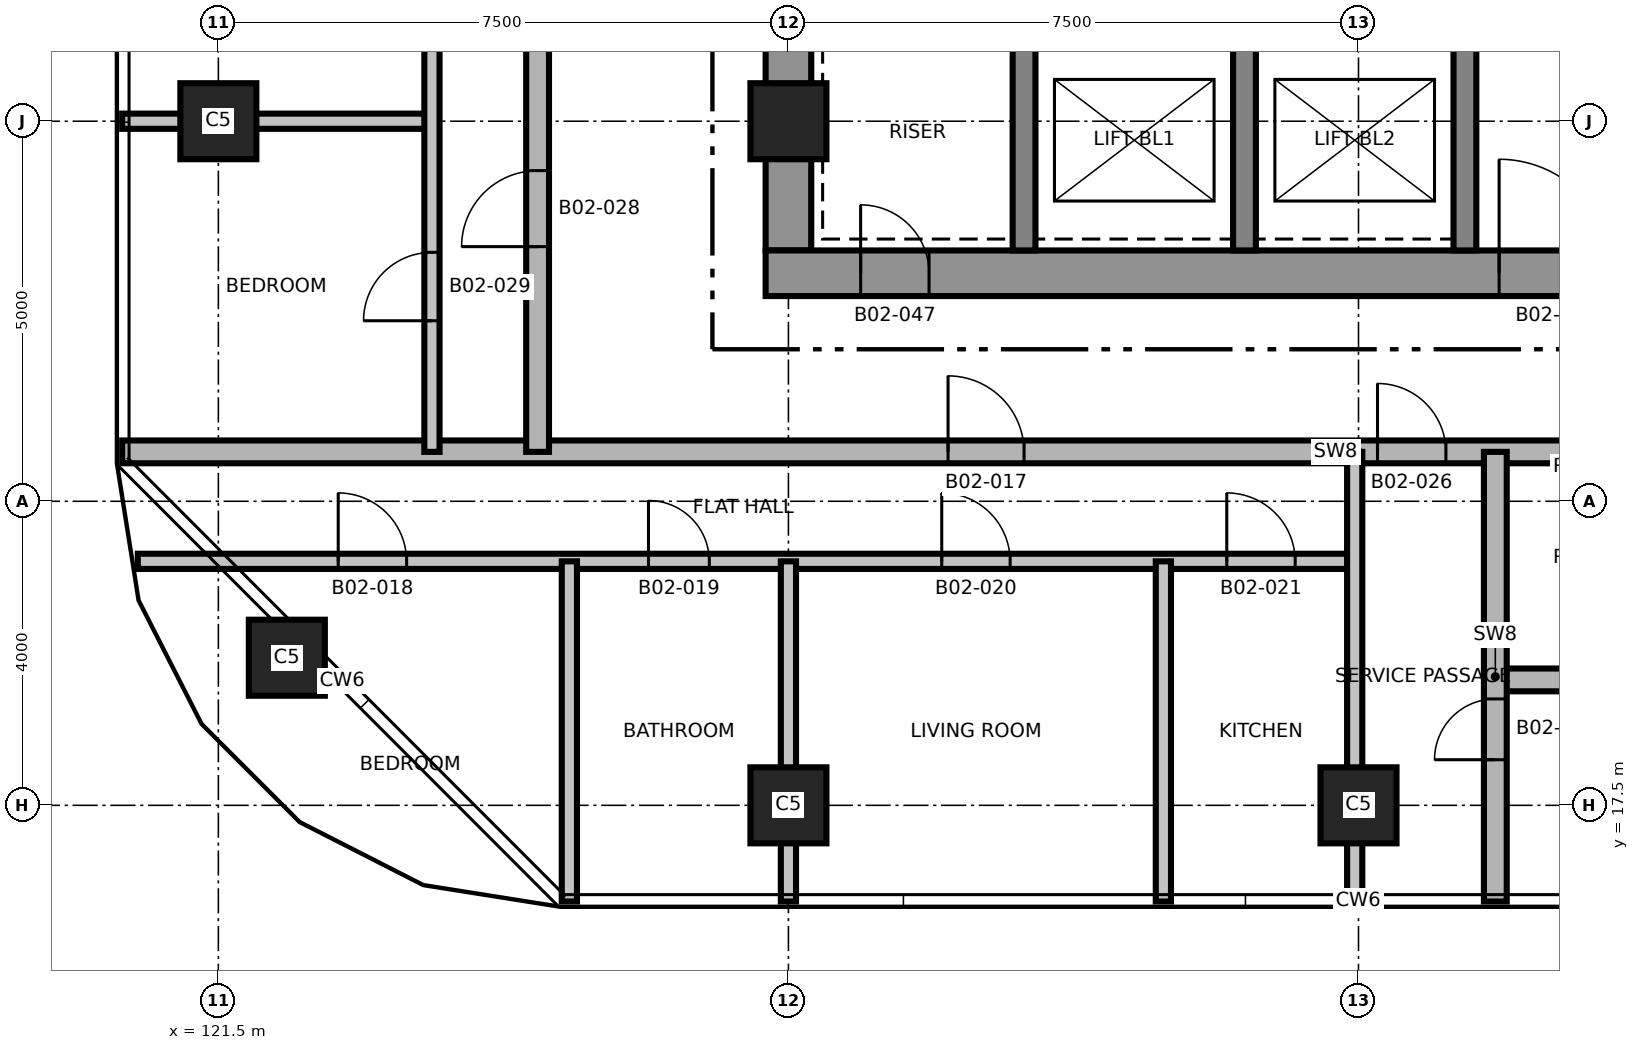
"""IFC4 building model, lengths in metres.
Left out: names, types, materials, properties, quantities, classifications, styles, units other than length and angle.
Written with IfcOpenShell. Run it as: python <this file> out.ifc"""

import sys

from ifc_helpers import new_model, si_unit, direction, frame, frame_2d, origin, origin_2d, place, context, subcontext, project, spatial, rectangle, extrude, element, fill, save


model = new_model("IFC4")
c1 = context("Model", 3, precision=1e-05, world=origin(), true_north=direction((0.0, 1.0)))
c2 = subcontext(c1, "Body", "Model", "MODEL_VIEW")
j1 = project(units=[si_unit("LENGTHUNIT", "METRE"), si_unit("PLANEANGLEUNIT", "RADIAN")], contexts=[c1])
p1 = place(None, origin())
s1 = spatial("IfcSite", under=j1, at=p1, CompositionType="ELEMENT")
p2 = place(p1, origin())
s2 = spatial("IfcBuilding", under=s1, at=p2, CompositionType="ELEMENT")
p3 = place(p2, frame((0.0, 0.0, 48.3)))
s3 = spatial("IfcBuildingStorey", under=s2, at=p3, CompositionType="ELEMENT", Elevation=48.3)
p4 = place(p3, frame((129.0, 24.8, 0.0), z_axis=(0.0, 0.0, 1.0), x_axis=(0.0, 1.0, 0.0)))
e1 = element("IfcWall", 1, at=p4, inside=s3, PredefinedType="SHEAR", context=c2, shape_type="SweptSolid", body=[
    extrude(rectangle(XDim=12.4, YDim=0.6, at=frame_2d((6.2, 0.0))), origin(), (0.0, 0.0, 1.0), 3.7),
])
p5 = place(p4, frame((5.15, 0.0, 0.0)))
e2 = element("IfcOpeningElement", 2, at=p5, cuts=e1, PredefinedType="OPENING", context=c2, shape_type="SweptSolid", body=[
    extrude(rectangle(XDim=1.0, YDim=2.1, at=frame_2d((0.5, 1.05))), frame((0.0, 0.31, 0.0), z_axis=(0.0, -1.0, 0.0), x_axis=(1.0, 0.0, 0.0)), (0.0, 0.0, 1.0), 0.62),
])
p6 = place(p3, frame((128.7, 24.5, 0.0), z_axis=(0.0, 0.0, 1.0), x_axis=(1.0, 0.0, 0.0)))
e3 = element("IfcWall", 3, at=p6, inside=s3, PredefinedType="SHEAR", context=c2, shape_type="SweptSolid", body=[
    extrude(rectangle(XDim=15.0, YDim=0.6, at=frame_2d((7.5, 0.0))), origin(), (0.0, 0.0, 1.0), 3.7),
])
p7 = place(p6, frame((9.65, 0.0, 0.0)))
e4 = element("IfcOpeningElement", 4, at=p7, cuts=e3, PredefinedType="OPENING", context=c2, shape_type="SweptSolid", body=[
    extrude(rectangle(XDim=1.5, YDim=2.1, at=frame_2d((0.75, 1.05))), frame((0.0, 0.31, 0.0), z_axis=(0.0, -1.0, 0.0), x_axis=(1.0, 0.0, 0.0)), (0.0, 0.0, 1.0), 0.62),
])
p8 = place(p6, frame((1.25, 0.0, 0.0)))
e5 = element("IfcOpeningElement", 5, at=p8, cuts=e3, PredefinedType="OPENING", context=c2, shape_type="SweptSolid", body=[
    extrude(rectangle(XDim=0.9, YDim=2.1, at=frame_2d((0.45, 1.05))), frame((0.0, 0.31, 0.0), z_axis=(0.0, -1.0, 0.0), x_axis=(1.0, 0.0, 0.0)), (0.0, 0.0, 1.0), 0.62),
])
p9 = place(p3, frame((132.1, 24.8, 0.0), z_axis=(0.0, 0.0, 1.0), x_axis=(0.0, 1.0, 0.0)))
e6 = element("IfcWall", 6, at=p9, inside=s3, PredefinedType="SHEAR", context=c2, shape_type="SweptSolid", body=[
    extrude(rectangle(XDim=12.4, YDim=0.3, at=frame_2d((6.2, 0.0))), origin(), (0.0, 0.0, 1.0), 3.7),
])
p10 = place(p9, frame((3.9, 0.0, 0.0)))
e7 = element("IfcOpeningElement", 7, at=p10, cuts=e6, PredefinedType="OPENING", context=c2, shape_type="SweptSolid", body=[
    extrude(rectangle(XDim=1.2, YDim=2.1, at=frame_2d((0.6, 1.05))), frame((0.0, 0.16, 0.0), z_axis=(0.0, -1.0, 0.0), x_axis=(1.0, 0.0, 0.0)), (0.0, 0.0, 1.0), 0.32),
])
p11 = place(p3, frame((137.9, 24.8, 0.0), z_axis=(0.0, 0.0, 1.0), x_axis=(0.0, 1.0, 0.0)))
e8 = element("IfcWall", 8, at=p11, inside=s3, PredefinedType="SHEAR", context=c2, shape_type="SweptSolid", body=[
    extrude(rectangle(XDim=12.4, YDim=0.3, at=frame_2d((6.2, 0.0))), origin(), (0.0, 0.0, 1.0), 3.7),
])
p12 = place(p11, frame((3.95, 0.0, 0.0)))
e9 = element("IfcOpeningElement", 9, at=p12, cuts=e8, PredefinedType="OPENING", context=c2, shape_type="SweptSolid", body=[
    extrude(rectangle(XDim=1.5, YDim=2.1, at=frame_2d((0.75, 1.05))), frame((0.0, 0.16, 0.0), z_axis=(0.0, -1.0, 0.0), x_axis=(1.0, 0.0, 0.0)), (0.0, 0.0, 1.0), 0.32),
])
p13 = place(p11, frame((10.45, 0.0, 0.0)))
e10 = element("IfcOpeningElement", 10, at=p13, cuts=e8, PredefinedType="OPENING", context=c2, shape_type="SweptSolid", body=[
    extrude(rectangle(XDim=0.9, YDim=2.1, at=frame_2d((0.45, 1.05))), frame((0.0, 0.16, 0.0), z_axis=(0.0, -1.0, 0.0), x_axis=(1.0, 0.0, 0.0)), (0.0, 0.0, 1.0), 0.32),
])
p14 = place(p3, frame((135.0, 24.8, 0.0), z_axis=(0.0, 0.0, 1.0), x_axis=(0.0, 1.0, 0.0)))
e11 = element("IfcWall", 11, at=p14, inside=s3, PredefinedType="SHEAR", context=c2, shape_type="SweptSolid", body=[
    extrude(rectangle(XDim=2.75, YDim=0.3, at=frame_2d((1.375, 0.0))), origin(), (0.0, 0.0, 1.0), 3.7),
])
for number, where, z_axis, x_axis in (
    (12, (129.0, 17.5, 0.0), (0.0, 0.0, 1.0), (1.0, 0.0, 0.0)),
    (13, (136.5, 17.5, 0.0), (0.0, 0.0, 1.0), (1.0, 0.0, 0.0)),
    (14, (122.401, 19.442, 0.0), (0.0, 0.0, 1.0), (1.0, 0.0, 0.0)),
    (15, (121.5, 26.5, 0.0), (0.0, 0.0, 1.0), (1.0, 0.0, 0.0)),
    (16, (129.0, 26.5, 0.0), (0.0, 0.0, 1.0), (1.0, 0.0, 0.0)),
):
    element("IfcColumn", number, at=place(p3, frame(where, z_axis=z_axis, x_axis=x_axis)), inside=s3, PredefinedType="COLUMN", context=c2, shape_type="SweptSolid", body=[
        extrude(rectangle(XDim=1.0, YDim=1.0, at=origin_2d()), origin(), (0.0, 0.0, 1.0), 3.7),
    ])
p15 = place(p3, frame((138.25, 19.15, 0.0), z_axis=(0.0, 0.0, 1.0), x_axis=(1.0, 0.0, 0.0)))
e17 = element("IfcWall", 17, at=p15, inside=s3, PredefinedType="SHEAR", context=c2, shape_type="SweptSolid", body=[
    extrude(rectangle(XDim=5.75, YDim=0.3, at=frame_2d((2.875, 0.0))), origin(), (0.0, 0.0, 1.0), 3.4),
])
p16 = place(p3, frame((120.44, 20.71, 0.0), z_axis=(0.0, 0.0, 1.0), x_axis=(1.0, 0.0, 0.0)))
e18 = element("IfcWall", 18, at=p16, inside=s3, PredefinedType="PARTITIONING", context=c2, shape_type="SweptSolid", body=[
    extrude(rectangle(XDim=16.06, YDim=0.2, at=frame_2d((8.03, 0.0))), origin(), (0.0, 0.0, 1.0), 3.4),
])
p17 = place(p16, frame((2.637, 0.0, 0.0)))
e19 = element("IfcOpeningElement", 19, at=p17, cuts=e18, PredefinedType="OPENING", context=c2, shape_type="SweptSolid", body=[
    extrude(rectangle(XDim=0.9, YDim=2.1, at=frame_2d((0.45, 1.05))), frame((0.0, 0.11, 0.0), z_axis=(0.0, -1.0, 0.0), x_axis=(1.0, 0.0, 0.0)), (0.0, 0.0, 1.0), 0.22),
])
p18 = place(p16, frame((6.719, 0.0, 0.0)))
e20 = element("IfcOpeningElement", 20, at=p18, cuts=e18, PredefinedType="OPENING", context=c2, shape_type="SweptSolid", body=[
    extrude(rectangle(XDim=0.8, YDim=2.1, at=frame_2d((0.4, 1.05))), frame((0.0, 0.11, 0.0), z_axis=(0.0, -1.0, 0.0), x_axis=(1.0, 0.0, 0.0)), (0.0, 0.0, 1.0), 0.22),
])
p19 = place(p16, frame((10.577, 0.0, 0.0)))
e21 = element("IfcOpeningElement", 21, at=p19, cuts=e18, PredefinedType="OPENING", context=c2, shape_type="SweptSolid", body=[
    extrude(rectangle(XDim=0.9, YDim=2.1, at=frame_2d((0.45, 1.05))), frame((0.0, 0.11, 0.0), z_axis=(0.0, -1.0, 0.0), x_axis=(1.0, 0.0, 0.0)), (0.0, 0.0, 1.0), 0.22),
])
p20 = place(p16, frame((14.327, 0.0, 0.0)))
e22 = element("IfcOpeningElement", 22, at=p20, cuts=e18, PredefinedType="OPENING", context=c2, shape_type="SweptSolid", body=[
    extrude(rectangle(XDim=0.9, YDim=2.1, at=frame_2d((0.45, 1.05))), frame((0.0, 0.11, 0.0), z_axis=(0.0, -1.0, 0.0), x_axis=(1.0, 0.0, 0.0)), (0.0, 0.0, 1.0), 0.22),
])
p21 = place(p3, frame((120.235, 22.15, 0.0), z_axis=(0.0, 0.0, 1.0), x_axis=(1.0, 0.0, 0.0)))
e23 = element("IfcWall", 23, at=p21, inside=s3, PredefinedType="SHEAR", context=c2, shape_type="SweptSolid", body=[
    extrude(rectangle(XDim=32.53, YDim=0.3, at=frame_2d((16.265, 0.0))), origin(), (0.0, 0.0, 1.0), 3.4),
])
p22 = place(p21, frame((22.515, 0.0, 0.0)))
e24 = element("IfcOpeningElement", 24, at=p22, cuts=e23, PredefinedType="OPENING", context=c2, shape_type="SweptSolid", body=[
    extrude(rectangle(XDim=1.0, YDim=2.1, at=frame_2d((0.5, 1.05))), frame((0.0, 0.16, 0.0), z_axis=(0.0, -1.0, 0.0), x_axis=(1.0, 0.0, 0.0)), (0.0, 0.0, 1.0), 0.32),
])
p23 = place(p21, frame((10.865, 0.0, 0.0)))
e25 = element("IfcOpeningElement", 25, at=p23, cuts=e23, PredefinedType="OPENING", context=c2, shape_type="SweptSolid", body=[
    extrude(rectangle(XDim=1.0, YDim=2.1, at=frame_2d((0.5, 1.05))), frame((0.0, 0.16, 0.0), z_axis=(0.0, -1.0, 0.0), x_axis=(1.0, 0.0, 0.0)), (0.0, 0.0, 1.0), 0.32),
])
p24 = place(p21, frame((24.415, 0.0, 0.0)))
e26 = element("IfcOpeningElement", 26, at=p24, cuts=e23, PredefinedType="OPENING", context=c2, shape_type="SweptSolid", body=[
    extrude(rectangle(XDim=1.0, YDim=2.1, at=frame_2d((0.5, 1.05))), frame((0.0, 0.16, 0.0), z_axis=(0.0, -1.0, 0.0), x_axis=(1.0, 0.0, 0.0)), (0.0, 0.0, 1.0), 0.32),
])
p25 = place(p21, frame((16.515, 0.0, 0.0)))
e27 = element("IfcOpeningElement", 27, at=p25, cuts=e23, PredefinedType="OPENING", context=c2, shape_type="SweptSolid", body=[
    extrude(rectangle(XDim=0.9, YDim=2.1, at=frame_2d((0.45, 1.05))), frame((0.0, 0.16, 0.0), z_axis=(0.0, -1.0, 0.0), x_axis=(1.0, 0.0, 0.0)), (0.0, 0.0, 1.0), 0.32),
])
p26 = place(p3, frame((120.235, 26.5, 0.0), z_axis=(0.0, 0.0, 1.0), x_axis=(1.0, 0.0, 0.0)))
e28 = element("IfcWall", 28, at=p26, inside=s3, PredefinedType="PARTITIONING", context=c2, shape_type="SweptSolid", body=[
    extrude(rectangle(XDim=4.075, YDim=0.2, at=frame_2d((2.038, 0.0))), origin(), (0.0, 0.0, 1.0), 3.4),
])
p27 = place(p3, frame((124.31, 22.15, 0.0), z_axis=(0.0, 0.0, 1.0), x_axis=(0.0, 1.0, 0.0)))
e29 = element("IfcWall", 29, at=p27, inside=s3, PredefinedType="PARTITIONING", context=c2, shape_type="SweptSolid", body=[
    extrude(rectangle(XDim=17.7, YDim=0.2, at=frame_2d((8.85, 0.0))), origin(), (0.0, 0.0, 1.0), 3.4),
])
p28 = place(p27, frame((1.725, 0.0, 0.0)))
e30 = element("IfcOpeningElement", 30, at=p28, cuts=e29, PredefinedType="OPENING", context=c2, shape_type="SweptSolid", body=[
    extrude(rectangle(XDim=0.9, YDim=2.1, at=frame_2d((0.45, 1.05))), frame((0.0, 0.11, 0.0), z_axis=(0.0, -1.0, 0.0), x_axis=(1.0, 0.0, 0.0)), (0.0, 0.0, 1.0), 0.22),
])
p29 = place(p27, frame((6.195, 0.0, 0.0)))
e31 = element("IfcOpeningElement", 31, at=p29, cuts=e29, PredefinedType="OPENING", context=c2, shape_type="SweptSolid", body=[
    extrude(rectangle(XDim=0.9, YDim=2.1, at=frame_2d((0.45, 1.05))), frame((0.0, 0.11, 0.0), z_axis=(0.0, -1.0, 0.0), x_axis=(1.0, 0.0, 0.0)), (0.0, 0.0, 1.0), 0.22),
])
p30 = place(p27, frame((9.641, 0.0, 0.0)))
e32 = element("IfcOpeningElement", 32, at=p30, cuts=e29, PredefinedType="OPENING", context=c2, shape_type="SweptSolid", body=[
    extrude(rectangle(XDim=0.9, YDim=2.1, at=frame_2d((0.45, 1.05))), frame((0.0, 0.11, 0.0), z_axis=(0.0, -1.0, 0.0), x_axis=(1.0, 0.0, 0.0)), (0.0, 0.0, 1.0), 0.22),
])
p31 = place(p27, frame((11.895, 0.0, 0.0)))
e33 = element("IfcOpeningElement", 33, at=p31, cuts=e29, PredefinedType="OPENING", context=c2, shape_type="SweptSolid", body=[
    extrude(rectangle(XDim=0.8, YDim=2.1, at=frame_2d((0.4, 1.05))), frame((0.0, 0.11, 0.0), z_axis=(0.0, -1.0, 0.0), x_axis=(1.0, 0.0, 0.0)), (0.0, 0.0, 1.0), 0.22),
])
p32 = place(p27, frame((14.378, 0.0, 0.0)))
e34 = element("IfcOpeningElement", 34, at=p32, cuts=e29, PredefinedType="OPENING", context=c2, shape_type="SweptSolid", body=[
    extrude(rectangle(XDim=0.9, YDim=2.1, at=frame_2d((0.45, 1.05))), frame((0.0, 0.11, 0.0), z_axis=(0.0, -1.0, 0.0), x_axis=(1.0, 0.0, 0.0)), (0.0, 0.0, 1.0), 0.22),
])
p33 = place(p27, frame((16.603, 0.0, 0.0)))
e35 = element("IfcOpeningElement", 35, at=p33, cuts=e29, PredefinedType="OPENING", context=c2, shape_type="SweptSolid", body=[
    extrude(rectangle(XDim=0.8, YDim=2.1, at=frame_2d((0.4, 1.05))), frame((0.0, 0.11, 0.0), z_axis=(0.0, -1.0, 0.0), x_axis=(1.0, 0.0, 0.0)), (0.0, 0.0, 1.0), 0.22),
])
p34 = place(p3, frame((125.7, 22.15, 0.0), z_axis=(0.0, 0.0, 1.0), x_axis=(0.0, 1.0, 0.0)))
e36 = element("IfcWall", 36, at=p34, inside=s3, PredefinedType="SHEAR", context=c2, shape_type="SweptSolid", body=[
    extrude(rectangle(XDim=17.7, YDim=0.3, at=frame_2d((8.85, 0.0))), origin(), (0.0, 0.0, 1.0), 3.4),
])
p35 = place(p34, frame((2.7, 0.0, 0.0)))
e37 = element("IfcOpeningElement", 37, at=p35, cuts=e36, PredefinedType="OPENING", context=c2, shape_type="SweptSolid", body=[
    extrude(rectangle(XDim=1.0, YDim=2.1, at=frame_2d((0.5, 1.05))), frame((0.0, 0.16, 0.0), z_axis=(0.0, -1.0, 0.0), x_axis=(1.0, 0.0, 0.0)), (0.0, 0.0, 1.0), 0.32),
])
for number, where, z_axis, x_axis in (
    (38, (126.118, 16.235, 0.0), (0.0, 0.0, 1.0), (0.0, 1.0, 0.0)),
    (39, (129.0, 16.235, 0.0), (0.0, 0.0, 1.0), (0.0, 1.0, 0.0)),
    (40, (133.933, 16.235, 0.0), (0.0, 0.0, 1.0), (0.0, 1.0, 0.0)),
):
    element("IfcWall", number, at=place(p3, frame(where, z_axis=z_axis, x_axis=x_axis)), inside=s3, PredefinedType="PARTITIONING", context=c2, shape_type="SweptSolid", body=[
        extrude(rectangle(XDim=4.475, YDim=0.2, at=frame_2d((2.237, 0.0))), origin(), (0.0, 0.0, 1.0), 3.4),
    ])
p36 = place(p3, frame((136.45, 16.235, 0.0), z_axis=(0.0, 0.0, 1.0), x_axis=(0.0, 1.0, 0.0)))
e41 = element("IfcWall", 41, at=p36, inside=s3, PredefinedType="PARTITIONING", context=c2, shape_type="SweptSolid", body=[
    extrude(rectangle(XDim=5.915, YDim=0.2, at=frame_2d((2.958, 0.0))), origin(), (0.0, 0.0, 1.0), 3.4),
])
p37 = place(p3, frame((138.3, 16.235, 0.0), z_axis=(0.0, 0.0, 1.0), x_axis=(0.0, 1.0, 0.0)))
e42 = element("IfcWall", 42, at=p37, inside=s3, PredefinedType="SHEAR", context=c2, shape_type="SweptSolid", body=[
    extrude(rectangle(XDim=5.915, YDim=0.3, at=frame_2d((2.958, 0.0))), origin(), (0.0, 0.0, 1.0), 3.4),
])
p38 = place(p37, frame((1.865, 0.0, 0.0)))
e43 = element("IfcOpeningElement", 43, at=p38, cuts=e42, PredefinedType="OPENING", context=c2, shape_type="SweptSolid", body=[
    extrude(rectangle(XDim=0.8, YDim=2.1, at=frame_2d((0.4, 1.05))), frame((0.0, 0.16, 0.0), z_axis=(0.0, -1.0, 0.0), x_axis=(1.0, 0.0, 0.0)), (0.0, 0.0, 1.0), 0.32),
])
p39 = place(p23, origin())
e44 = element("IfcDoor", 44, at=p39, inside=s3, OperationType="SINGLE_SWING_LEFT", PredefinedType="DOOR", context=c2, shape_type="SweptSolid", body=[
    extrude(rectangle(XDim=1.0, YDim=2.1, at=frame_2d((0.5, 1.05))), frame((0.0, 0.025, 0.0), z_axis=(0.0, -1.0, 0.0), x_axis=(1.0, 0.0, 0.0)), (0.0, 0.0, 1.0), 0.05),
])
fill(e25, e44)
p40 = place(p17, origin())
e45 = element("IfcDoor", 45, at=p40, inside=s3, OperationType="SINGLE_SWING_RIGHT", PredefinedType="DOOR", context=c2, shape_type="SweptSolid", body=[
    extrude(rectangle(XDim=0.9, YDim=2.1, at=frame_2d((0.45, 1.05))), frame((0.0, 0.025, 0.0), z_axis=(0.0, -1.0, 0.0), x_axis=(1.0, 0.0, 0.0)), (0.0, 0.0, 1.0), 0.05),
])
fill(e19, e45)
p41 = place(p18, origin())
e46 = element("IfcDoor", 46, at=p41, inside=s3, OperationType="SINGLE_SWING_LEFT", PredefinedType="DOOR", context=c2, shape_type="SweptSolid", body=[
    extrude(rectangle(XDim=0.8, YDim=2.1, at=frame_2d((0.4, 1.05))), frame((0.0, 0.025, 0.0), z_axis=(0.0, -1.0, 0.0), x_axis=(1.0, 0.0, 0.0)), (0.0, 0.0, 1.0), 0.05),
])
fill(e20, e46)
p42 = place(p19, origin())
e47 = element("IfcDoor", 47, at=p42, inside=s3, OperationType="SINGLE_SWING_RIGHT", PredefinedType="DOOR", context=c2, shape_type="SweptSolid", body=[
    extrude(rectangle(XDim=0.9, YDim=2.1, at=frame_2d((0.45, 1.05))), frame((0.0, 0.025, 0.0), z_axis=(0.0, -1.0, 0.0), x_axis=(1.0, 0.0, 0.0)), (0.0, 0.0, 1.0), 0.05),
])
fill(e21, e47)
p43 = place(p20, origin())
e48 = element("IfcDoor", 48, at=p43, inside=s3, OperationType="SINGLE_SWING_LEFT", PredefinedType="DOOR", context=c2, shape_type="SweptSolid", body=[
    extrude(rectangle(XDim=0.9, YDim=2.1, at=frame_2d((0.45, 1.05))), frame((0.0, 0.025, 0.0), z_axis=(0.0, -1.0, 0.0), x_axis=(1.0, 0.0, 0.0)), (0.0, 0.0, 1.0), 0.05),
])
fill(e22, e48)
p44 = place(p25, origin())
e49 = element("IfcDoor", 49, at=p44, inside=s3, OperationType="SINGLE_SWING_RIGHT", PredefinedType="DOOR", context=c2, shape_type="SweptSolid", body=[
    extrude(rectangle(XDim=0.9, YDim=2.1, at=frame_2d((0.45, 1.05))), frame((0.0, 0.025, 0.0), z_axis=(0.0, -1.0, 0.0), x_axis=(1.0, 0.0, 0.0)), (0.0, 0.0, 1.0), 0.05),
])
fill(e27, e49)
p45 = place(p38, origin())
e50 = element("IfcDoor", 50, at=p45, inside=s3, OperationType="SINGLE_SWING_LEFT", PredefinedType="DOOR", context=c2, shape_type="SweptSolid", body=[
    extrude(rectangle(XDim=0.8, YDim=2.1, at=frame_2d((0.4, 1.05))), frame((0.0, 0.025, 0.0), z_axis=(0.0, -1.0, 0.0), x_axis=(1.0, 0.0, 0.0)), (0.0, 0.0, 1.0), 0.05),
])
fill(e43, e50)
p46 = place(p35, origin())
e51 = element("IfcDoor", 51, at=p46, inside=s3, OperationType="SINGLE_SWING_RIGHT", PredefinedType="DOOR", context=c2, shape_type="SweptSolid", body=[
    extrude(rectangle(XDim=1.0, YDim=2.1, at=frame_2d((0.5, 1.05))), frame((0.0, 0.025, 0.0), z_axis=(0.0, -1.0, 0.0), x_axis=(1.0, 0.0, 0.0)), (0.0, 0.0, 1.0), 0.05),
])
fill(e37, e51)
p47 = place(p28, origin())
e52 = element("IfcDoor", 52, at=p47, inside=s3, OperationType="SINGLE_SWING_LEFT", PredefinedType="DOOR", context=c2, shape_type="SweptSolid", body=[
    extrude(rectangle(XDim=0.9, YDim=2.1, at=frame_2d((0.45, 1.05))), frame((0.0, 0.025, 0.0), z_axis=(0.0, -1.0, 0.0), x_axis=(1.0, 0.0, 0.0)), (0.0, 0.0, 1.0), 0.05),
])
fill(e30, e52)
p48 = place(p7, origin())
e53 = element("IfcDoor", 53, at=p48, inside=s3, OperationType="SINGLE_SWING_LEFT", PredefinedType="DOOR", context=c2, shape_type="SweptSolid", body=[
    extrude(rectangle(XDim=1.5, YDim=2.1, at=frame_2d((0.75, 1.05))), frame((0.0, 0.025, 0.0), z_axis=(0.0, -1.0, 0.0), x_axis=(1.0, 0.0, 0.0)), (0.0, 0.0, 1.0), 0.05),
])
fill(e4, e53)
p49 = place(p8, origin())
e54 = element("IfcDoor", 54, at=p49, inside=s3, OperationType="SINGLE_SWING_LEFT", PredefinedType="DOOR", context=c2, shape_type="SweptSolid", body=[
    extrude(rectangle(XDim=0.9, YDim=2.1, at=frame_2d((0.45, 1.05))), frame((0.0, 0.025, 0.0), z_axis=(0.0, -1.0, 0.0), x_axis=(1.0, 0.0, 0.0)), (0.0, 0.0, 1.0), 0.05),
])
fill(e5, e54)
save(model, sys.argv[1])
